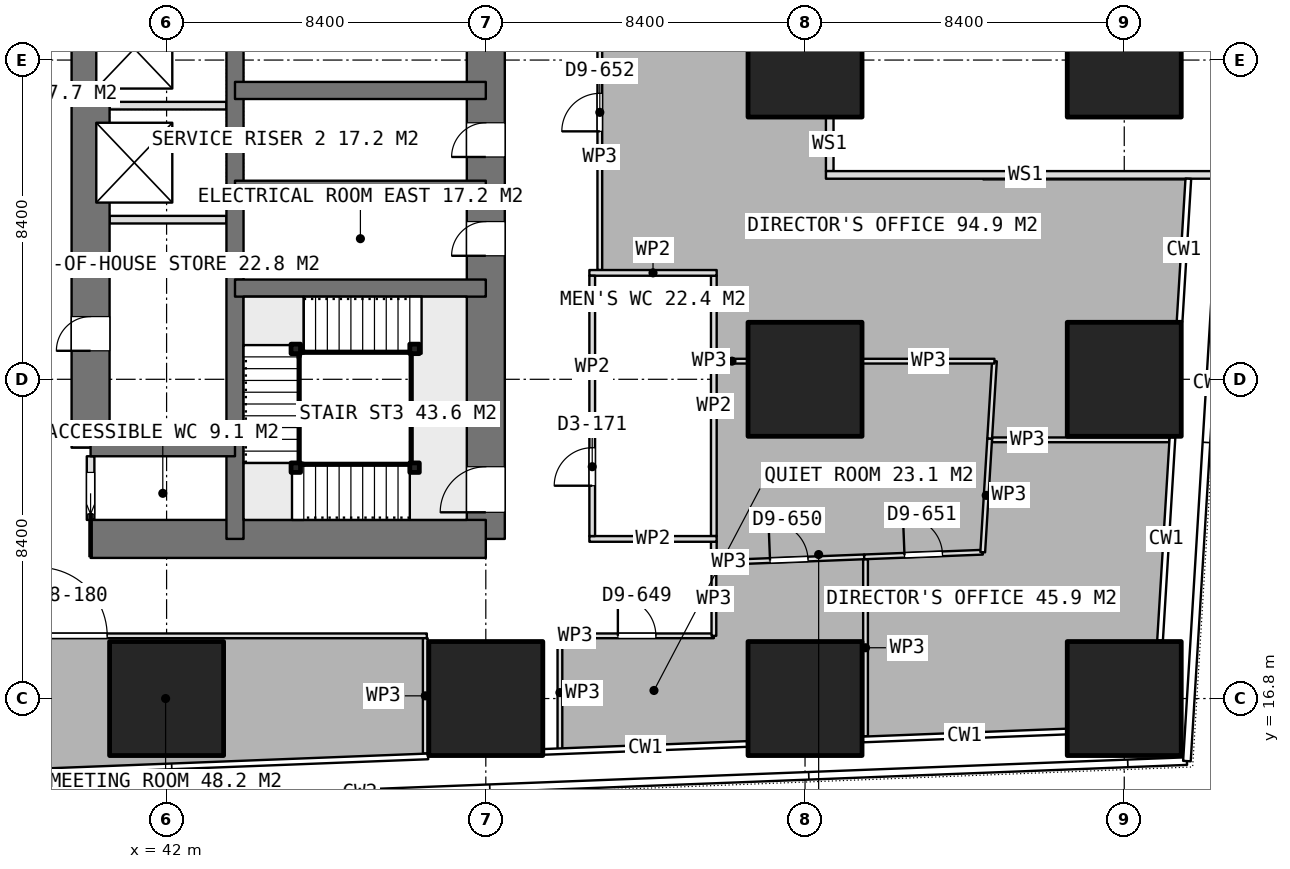
"""IFC4 building model, lengths in metres.
Left out: names, types, materials, properties, quantities, classifications, styles, units other than length and angle.
Written with IfcOpenShell. Run it as: python <this file> out.ifc"""

import sys

from ifc_helpers import new_model, si_unit, direction, frame, frame_2d, origin, origin_2d, place, context, subcontext, project, spatial, rectangle, extrude, element, fill, save


model = new_model("IFC4")
c1 = context("Model", 3, precision=1e-05, world=origin(), true_north=direction((0.0, 1.0)))
c2 = subcontext(c1, "Body", "Model", "MODEL_VIEW")
j1 = project(units=[si_unit("LENGTHUNIT", "METRE"), si_unit("PLANEANGLEUNIT", "RADIAN")], contexts=[c1])
p1 = place(None, origin())
s1 = spatial("IfcSite", under=j1, at=p1, CompositionType="ELEMENT")
p2 = place(p1, origin())
s2 = spatial("IfcBuilding", under=s1, at=p2, CompositionType="ELEMENT")
p3 = place(p2, frame((0.0, 0.0, 159.05)))
s3 = spatial("IfcBuildingStorey", under=s2, at=p3, CompositionType="ELEMENT", Elevation=159.05)
p4 = place(p3, frame((40.0, 21.0, 0.0), z_axis=(0.0, 0.0, 1.0), x_axis=(1.0, 0.0, 0.0)))
e1 = element("IfcWall", 1, at=p4, inside=s3, PredefinedType="SHEAR", context=c2, shape_type="SweptSolid", body=[
    extrude(rectangle(XDim=10.4, YDim=1.0, at=frame_2d((5.2, 0.0))), origin(), (0.0, 0.0, 1.0), 3.75),
])
p5 = place(p3, frame((50.4, 21.0, 0.0), z_axis=(0.0, 0.0, 1.0), x_axis=(0.0, 1.0, 0.0)))
e2 = element("IfcWall", 2, at=p5, inside=s3, PredefinedType="SHEAR", context=c2, shape_type="SweptSolid", body=[
    extrude(rectangle(XDim=25.2, YDim=1.0, at=frame_2d((12.6, 0.0))), origin(), (0.0, 0.0, 1.0), 3.75),
])
p6 = place(p5, frame((16.2, 0.0, 0.0)))
e3 = element("IfcOpeningElement", 3, at=p6, cuts=e2, PredefinedType="OPENING", context=c2, shape_type="SweptSolid", body=[
    extrude(rectangle(XDim=1.2, YDim=2.1, at=frame_2d((0.6, 1.05))), frame((0.0, 0.51, 0.0), z_axis=(0.0, -1.0, 0.0), x_axis=(1.0, 0.0, 0.0)), (0.0, 0.0, 1.0), 1.02),
])
p7 = place(p5, frame((10.05, 0.0, 0.0)))
e4 = element("IfcOpeningElement", 4, at=p7, cuts=e2, PredefinedType="OPENING", context=c2, shape_type="SweptSolid", body=[
    extrude(rectangle(XDim=0.9, YDim=2.1, at=frame_2d((0.45, 1.05))), frame((0.0, 0.51, 0.0), z_axis=(0.0, -1.0, 0.0), x_axis=(1.0, 0.0, 0.0)), (0.0, 0.0, 1.0), 1.02),
])
p8 = place(p5, frame((7.45, 0.0, 0.0)))
e5 = element("IfcOpeningElement", 5, at=p8, cuts=e2, PredefinedType="OPENING", context=c2, shape_type="SweptSolid", body=[
    extrude(rectangle(XDim=0.9, YDim=2.1, at=frame_2d((0.45, 1.05))), frame((0.0, 0.51, 0.0), z_axis=(0.0, -1.0, 0.0), x_axis=(1.0, 0.0, 0.0)), (0.0, 0.0, 1.0), 1.02),
])
p9 = place(p5, frame((0.7, 0.0, 0.0)))
e6 = element("IfcOpeningElement", 6, at=p9, cuts=e2, PredefinedType="OPENING", context=c2, shape_type="SweptSolid", body=[
    extrude(rectangle(XDim=1.2, YDim=2.1, at=frame_2d((0.6, 1.05))), frame((0.0, 0.51, 0.0), z_axis=(0.0, -1.0, 0.0), x_axis=(1.0, 0.0, 0.0)), (0.0, 0.0, 1.0), 1.02),
])
p10 = place(p3, frame((43.8, 21.0, 0.0), z_axis=(0.0, 0.0, 1.0), x_axis=(0.0, 1.0, 0.0)))
e7 = element("IfcWall", 7, at=p10, inside=s3, PredefinedType="SHEAR", context=c2, shape_type="SweptSolid", body=[
    extrude(rectangle(XDim=25.2, YDim=0.45, at=frame_2d((12.6, 0.0))), origin(), (0.0, 0.0, 1.0), 3.75),
])
p11 = place(p3, frame((40.0, 23.4, 0.0), z_axis=(0.0, 0.0, 1.0), x_axis=(0.0, 1.0, 0.0)))
e8 = element("IfcWall", 8, at=p11, inside=s3, PredefinedType="SHEAR", context=c2, shape_type="SweptSolid", body=[
    extrude(rectangle(XDim=18.0, YDim=1.0, at=frame_2d((9.0, 0.0))), origin(), (0.0, 0.0, 1.0), 3.75),
])
p12 = place(p11, frame((2.55, 0.0, 0.0)))
e9 = element("IfcOpeningElement", 9, at=p12, cuts=e8, PredefinedType="OPENING", context=c2, shape_type="SweptSolid", body=[
    extrude(rectangle(XDim=0.9, YDim=2.1, at=frame_2d((0.45, 1.05))), frame((0.0, 0.51, 0.0), z_axis=(0.0, -1.0, 0.0), x_axis=(1.0, 0.0, 0.0)), (0.0, 0.0, 1.0), 1.02),
])
p13 = place(p3, frame((40.0, 23.4, 0.0), z_axis=(0.0, 0.0, 1.0), x_axis=(1.0, 0.0, 0.0)))
e10 = element("IfcWall", 10, at=p13, inside=s3, PredefinedType="SHEAR", context=c2, shape_type="SweptSolid", body=[
    extrude(rectangle(XDim=3.8, YDim=0.45, at=frame_2d((1.9, 0.0))), origin(), (0.0, 0.0, 1.0), 3.75),
])
for number, where, z_axis, x_axis in (
    (11, (43.8, 27.6, 0.0), (0.0, 0.0, 1.0), (1.0, 0.0, 0.0)),
    (12, (43.8, 30.2, 0.0), (0.0, 0.0, 1.0), (1.0, 0.0, 0.0)),
    (13, (43.8, 32.8, 0.0), (0.0, 0.0, 1.0), (1.0, 0.0, 0.0)),
):
    element("IfcWall", number, at=place(p3, frame(where, z_axis=z_axis, x_axis=x_axis)), inside=s3, PredefinedType="SHEAR", context=c2, shape_type="SweptSolid", body=[
        extrude(rectangle(XDim=6.6, YDim=0.45, at=frame_2d((3.3, 0.0))), origin(), (0.0, 0.0, 1.0), 3.75),
    ])
for number, where, z_axis, x_axis in (
    (14, (42.0, 16.8, 0.0), (0.0, 0.0, 1.0), (1.0, 0.0, 0.0)),
    (15, (50.4, 16.8, 0.0), (0.0, 0.0, 1.0), (1.0, 0.0, 0.0)),
    (16, (58.8, 16.8, 0.0), (0.0, 0.0, 1.0), (1.0, 0.0, 0.0)),
    (17, (58.8, 25.2, 0.0), (0.0, 0.0, 1.0), (1.0, 0.0, 0.0)),
    (18, (58.8, 33.6, 0.0), (0.0, 0.0, 1.0), (1.0, 0.0, 0.0)),
    (19, (67.2, 16.8, 0.0), (0.0, 0.0, 1.0), (1.0, 0.0, 0.0)),
    (20, (67.2, 25.2, 0.0), (0.0, 0.0, 1.0), (1.0, 0.0, 0.0)),
    (21, (67.2, 33.6, 0.0), (0.0, 0.0, 1.0), (1.0, 0.0, 0.0)),
):
    element("IfcColumn", number, at=place(p3, frame(where, z_axis=z_axis, x_axis=x_axis)), inside=s3, PredefinedType="COLUMN", context=c2, shape_type="SweptSolid", body=[
        extrude(rectangle(XDim=3.0, YDim=3.0, at=origin_2d()), origin(), (0.0, 0.0, 1.0), 3.75),
    ])
for number, where, z_axis, x_axis in (
    (22, (40.5, 29.4, 0.0), (0.0, 0.0, 1.0), (1.0, 0.0, 0.0)),
    (23, (40.5, 32.4, 0.0), (0.0, 0.0, 1.0), (1.0, 0.0, 0.0)),
):
    element("IfcWall", number, at=place(p3, frame(where, z_axis=z_axis, x_axis=x_axis)), inside=s3, PredefinedType="PARTITIONING", context=c2, shape_type="SweptSolid", body=[
        extrude(rectangle(XDim=3.075, YDim=0.2, at=frame_2d((1.538, 0.0))), origin(), (0.0, 0.0, 1.0), 3.4),
    ])
p14 = place(p3, frame((40.0, 21.5, 0.0), z_axis=(0.0, 0.0, 1.0), x_axis=(0.0, 1.0, 0.0)))
e24 = element("IfcWall", 24, at=p14, inside=s3, PredefinedType="PARTITIONING", context=c2, shape_type="SweptSolid", body=[
    extrude(rectangle(XDim=1.675, YDim=0.2, at=frame_2d((0.837, 0.0))), origin(), (0.0, 0.0, 1.0), 3.4),
])
p15 = place(p14, frame((0.15, 0.0, 0.0)))
e25 = element("IfcOpeningElement", 25, at=p15, cuts=e24, PredefinedType="OPENING", context=c2, shape_type="SweptSolid", body=[
    extrude(rectangle(XDim=1.1, YDim=2.1, at=frame_2d((0.55, 1.05))), frame((0.0, 0.11, 0.0), z_axis=(0.0, -1.0, 0.0), x_axis=(1.0, 0.0, 0.0)), (0.0, 0.0, 1.0), 0.22),
])
for number, where, z_axis, x_axis in (
    (26, (53.125, 21.0, 0.0), (0.0, 0.0, 1.0), (1.0, 0.0, 0.0)),
    (27, (53.125, 28.0, 0.0), (0.0, 0.0, 1.0), (1.0, 0.0, 0.0)),
):
    element("IfcWall", number, at=place(p3, frame(where, z_axis=z_axis, x_axis=x_axis)), inside=s3, PredefinedType="PARTITIONING", context=c2, shape_type="SweptSolid", body=[
        extrude(rectangle(XDim=3.35, YDim=0.15, at=frame_2d((1.675, 0.0))), origin(), (0.0, 0.0, 1.0), 3.4),
    ])
p16 = place(p3, frame((53.2, 21.075, 0.0), z_axis=(0.0, 0.0, 1.0), x_axis=(0.0, 1.0, 0.0)))
e28 = element("IfcWall", 28, at=p16, inside=s3, PredefinedType="PARTITIONING", context=c2, shape_type="SweptSolid", body=[
    extrude(rectangle(XDim=6.85, YDim=0.15, at=frame_2d((3.425, 0.0))), origin(), (0.0, 0.0, 1.0), 3.4),
])
p17 = place(p16, frame((1.325, 0.0, 0.0)))
e29 = element("IfcOpeningElement", 29, at=p17, cuts=e28, PredefinedType="OPENING", context=c2, shape_type="SweptSolid", body=[
    extrude(rectangle(XDim=1.0, YDim=2.1, at=frame_2d((0.5, 1.05))), frame((0.0, 0.085, 0.0), z_axis=(0.0, -1.0, 0.0), x_axis=(1.0, 0.0, 0.0)), (0.0, 0.0, 1.0), 0.17),
])
p18 = place(p3, frame((56.4, 21.075, 0.0), z_axis=(0.0, 0.0, 1.0), x_axis=(0.0, 1.0, 0.0)))
e30 = element("IfcWall", 30, at=p18, inside=s3, PredefinedType="PARTITIONING", context=c2, shape_type="SweptSolid", body=[
    extrude(rectangle(XDim=6.85, YDim=0.15, at=frame_2d((3.425, 0.0))), origin(), (0.0, 0.0, 1.0), 3.4),
])
p19 = place(p3, frame((52.35, 15.463, 0.0), z_axis=(0.0, 0.0, 1.0), x_axis=(0.0, 1.0, 0.0)))
e31 = element("IfcWall", 31, at=p19, inside=s3, PredefinedType="PARTITIONING", context=c2, shape_type="SweptSolid", body=[
    extrude(rectangle(XDim=2.987, YDim=0.125, at=frame_2d((1.494, 0.0))), origin(), (0.0, 0.0, 1.0), 3.4),
])
p20 = place(p3, frame((52.35, 18.45, 0.0), z_axis=(0.0, 0.0, 1.0), x_axis=(1.0, 0.0, 0.0)))
e32 = element("IfcWall", 32, at=p20, inside=s3, PredefinedType="PARTITIONING", context=c2, shape_type="SweptSolid", body=[
    extrude(rectangle(XDim=4.05, YDim=0.125, at=frame_2d((2.025, 0.0))), origin(), (0.0, 0.0, 1.0), 3.4),
])
p21 = place(p20, frame((1.525, 0.0, 0.0)))
e33 = element("IfcOpeningElement", 33, at=p21, cuts=e32, PredefinedType="OPENING", context=c2, shape_type="SweptSolid", body=[
    extrude(rectangle(XDim=1.0, YDim=2.1, at=frame_2d((0.5, 1.05))), frame((0.0, 0.073, 0.0), z_axis=(0.0, -1.0, 0.0), x_axis=(1.0, 0.0, 0.0)), (0.0, 0.0, 1.0), 0.145),
])
p22 = place(p3, frame((56.402, 18.45, 0.0), z_axis=(0.0, 0.0, 1.0), x_axis=(0.0, 1.0, 0.0)))
e34 = element("IfcWall", 34, at=p22, inside=s3, PredefinedType="PARTITIONING", context=c2, shape_type="SweptSolid", body=[
    extrude(rectangle(XDim=1.924, YDim=0.125, at=frame_2d((0.962, 0.0))), origin(), (0.0, 0.0, 1.0), 3.4),
])
p23 = place(p3, frame((56.402, 20.374, 0.0), z_axis=(0.0, 0.0, 1.0), x_axis=(0.999241819363, 0.03893310207, 0.0)))
e35 = element("IfcWall", 35, at=p23, inside=s3, PredefinedType="PARTITIONING", context=c2, shape_type="SweptSolid", body=[
    extrude(rectangle(XDim=3.957, YDim=0.125, at=frame_2d((1.979, 0.0))), origin(), (0.0, 0.0, 1.0), 3.4),
])
p24 = place(p23, frame((1.478, 0.0, 0.0)))
e36 = element("IfcOpeningElement", 36, at=p24, cuts=e35, PredefinedType="OPENING", context=c2, shape_type="SweptSolid", body=[
    extrude(rectangle(XDim=1.0, YDim=2.1, at=frame_2d((0.5, 1.05))), frame((0.0, 0.073, 0.0), z_axis=(0.0, -1.0, 0.0), x_axis=(1.0, 0.0, 0.0)), (0.0, 0.0, 1.0), 0.145),
])
p25 = place(p3, frame((60.392, 20.467, 0.0), z_axis=(0.0, 0.0, 1.0), x_axis=(0.0, -1.0, 0.0)))
e37 = element("IfcWall", 37, at=p25, inside=s3, PredefinedType="PARTITIONING", context=c2, shape_type="SweptSolid", body=[
    extrude(rectangle(XDim=4.661, YDim=0.125, at=frame_2d((2.331, 0.0))), origin(), (0.0, 0.0, 1.0), 3.4),
])
p26 = place(p3, frame((63.72, 23.607, 0.0), z_axis=(0.0, 0.0, 1.0), x_axis=(1.0, 0.0, 0.0)))
e38 = element("IfcWall", 38, at=p26, inside=s3, PredefinedType="PARTITIONING", context=c2, shape_type="SweptSolid", body=[
    extrude(rectangle(XDim=4.666, YDim=0.125, at=frame_2d((2.333, 0.0))), origin(), (0.0, 0.0, 1.0), 3.4),
])
p27 = place(p3, frame((60.357, 20.528, 0.0), z_axis=(0.0, 0.0, 1.0), x_axis=(0.999238123198, 0.03902785093, 0.0)))
e39 = element("IfcWall", 39, at=p27, inside=s3, PredefinedType="PARTITIONING", context=c2, shape_type="SweptSolid", body=[
    extrude(rectangle(XDim=3.122, YDim=0.125, at=frame_2d((1.561, 0.0))), origin(), (0.0, 0.0, 1.0), 3.4),
])
p28 = place(p27, frame((1.061, 0.0, 0.0)))
e40 = element("IfcOpeningElement", 40, at=p28, cuts=e39, PredefinedType="OPENING", context=c2, shape_type="SweptSolid", body=[
    extrude(rectangle(XDim=1.0, YDim=2.1, at=frame_2d((0.5, 1.05))), frame((0.0, 0.073, 0.0), z_axis=(0.0, -1.0, 0.0), x_axis=(1.0, 0.0, 0.0)), (0.0, 0.0, 1.0), 0.145),
])
p29 = place(p3, frame((63.476, 20.65, 0.0), z_axis=(0.0, 0.0, 1.0), x_axis=(0.061018961694, 0.99813660704, 0.0)))
e41 = element("IfcWall", 41, at=p29, inside=s3, PredefinedType="PARTITIONING", context=c2, shape_type="SweptSolid", body=[
    extrude(rectangle(XDim=2.997, YDim=0.125, at=frame_2d((1.499, 0.0))), origin(), (0.0, 0.0, 1.0), 3.4),
])
p30 = place(p3, frame((63.659, 23.642, 0.0), z_axis=(0.0, 0.0, 1.0), x_axis=(0.061312146847, 0.998118640568, 0.0)))
e42 = element("IfcWall", 42, at=p30, inside=s3, PredefinedType="PARTITIONING", context=c2, shape_type="SweptSolid", body=[
    extrude(rectangle(XDim=2.039, YDim=0.125, at=frame_2d((1.02, 0.0))), origin(), (0.0, 0.0, 1.0), 3.4),
])
p31 = place(p3, frame((63.784, 25.677, 0.0), z_axis=(0.0, 0.0, 1.0), x_axis=(-1.0, 0.0, 0.0)))
e43 = element("IfcWall", 43, at=p31, inside=s3, PredefinedType="PARTITIONING", context=c2, shape_type="SweptSolid", body=[
    extrude(rectangle(XDim=3.464, YDim=0.125, at=frame_2d((1.732, 0.0))), origin(), (0.0, 0.0, 1.0), 3.4),
])
p32 = place(p3, frame((57.28, 25.677, 0.0), z_axis=(0.0, 0.0, 1.0), x_axis=(-1.0, 0.0, 0.0)))
e44 = element("IfcWall", 44, at=p32, inside=s3, PredefinedType="PARTITIONING", context=c2, shape_type="SweptSolid", body=[
    extrude(rectangle(XDim=0.805, YDim=0.125, at=frame_2d((0.402, 0.0))), origin(), (0.0, 0.0, 1.0), 3.4),
])
p33 = place(p3, frame((53.4, 28.075, 0.0), z_axis=(0.0, 0.0, 1.0), x_axis=(0.0, 1.0, 0.0)))
e45 = element("IfcWall", 45, at=p33, inside=s3, PredefinedType="PARTITIONING", context=c2, shape_type="SweptSolid", body=[
    extrude(rectangle(XDim=8.514, YDim=0.125, at=frame_2d((4.257, 0.0))), origin(), (0.0, 0.0, 1.0), 3.4),
])
p34 = place(p33, frame((3.649, 0.0, 0.0)))
e46 = element("IfcOpeningElement", 46, at=p34, cuts=e45, PredefinedType="OPENING", context=c2, shape_type="SweptSolid", body=[
    extrude(rectangle(XDim=1.0, YDim=2.1, at=frame_2d((0.5, 1.05))), frame((0.0, 0.073, 0.0), z_axis=(0.0, -1.0, 0.0), x_axis=(1.0, 0.0, 0.0)), (0.0, 0.0, 1.0), 0.145),
])
p35 = place(p3, frame((33.826, 18.45, 0.0), z_axis=(0.0, 0.0, 1.0), x_axis=(1.0, 0.0, 0.0)))
e47 = element("IfcWall", 47, at=p35, inside=s3, PredefinedType="PARTITIONING", context=c2, shape_type="SweptSolid", body=[
    extrude(rectangle(XDim=15.022, YDim=0.125, at=frame_2d((7.511, 0.0))), origin(), (0.0, 0.0, 1.0), 3.4),
])
p36 = place(p35, frame((4.811, 0.0, 0.0)))
e48 = element("IfcOpeningElement", 48, at=p36, cuts=e47, PredefinedType="OPENING", context=c2, shape_type="SweptSolid", body=[
    extrude(rectangle(XDim=1.8, YDim=2.1, at=frame_2d((0.9, 1.05))), frame((0.0, 0.073, 0.0), z_axis=(0.0, -1.0, 0.0), x_axis=(1.0, 0.0, 0.0)), (0.0, 0.0, 1.0), 0.145),
])
p37 = place(p3, frame((48.807, 18.387, 0.0), z_axis=(0.0, 0.0, 1.0), x_axis=(0.0, -1.0, 0.0)))
e49 = element("IfcWall", 49, at=p37, inside=s3, PredefinedType="PARTITIONING", context=c2, shape_type="SweptSolid", body=[
    extrude(rectangle(XDim=3.032, YDim=0.125, at=frame_2d((1.516, 0.0))), origin(), (0.0, 0.0, 1.0), 3.4),
])
p38 = place(p3, frame((56.4, 20.374, 0.0), z_axis=(0.0, 0.0, 1.0), x_axis=(0.0, 1.0, 0.0)))
e50 = element("IfcWall", 50, at=p38, inside=s3, PredefinedType="PARTITIONING", context=c2, shape_type="SweptSolid", body=[
    extrude(rectangle(XDim=0.551, YDim=0.15, at=frame_2d((0.275, 0.0))), origin(), (0.0, 0.0, 1.0), 3.4),
])
for number, where, z_axis, x_axis in (
    (51, (48.525, 22.875, 0.0), (0.0, 0.0, 1.0), (1.0, 0.0, 0.0)),
    (52, (45.4, 22.875, 0.0), (0.0, 0.0, 1.0), (1.0, 0.0, 0.0)),
    (53, (45.4, 26.0, 0.0), (0.0, 0.0, 1.0), (1.0, 0.0, 0.0)),
    (54, (48.525, 26.0, 0.0), (0.0, 0.0, 1.0), (1.0, 0.0, 0.0)),
):
    element("IfcColumn", number, at=place(p3, frame(where, z_axis=z_axis, x_axis=x_axis)), inside=s3, PredefinedType="COLUMN", context=c2, shape_type="SweptSolid", body=[
        extrude(rectangle(XDim=0.25, YDim=0.25, at=origin_2d()), origin(), (0.0, 0.0, 1.0), 3.75),
    ])
p39 = place(p3, frame((59.45, 30.678, 0.0), z_axis=(0.0, 0.0, 1.0), x_axis=(0.0, 1.0, 0.0)))
e55 = element("IfcWall", 55, at=p39, inside=s3, PredefinedType="PARTITIONING", context=c2, shape_type="SweptSolid", body=[
    extrude(rectangle(XDim=1.422, YDim=0.2, at=frame_2d((0.711, 0.0))), origin(), (0.0, 0.0, 1.0), 3.4),
])
p40 = place(p3, frame((59.35, 30.578, 0.0), z_axis=(0.0, 0.0, 1.0), x_axis=(1.0, 0.0, 0.0)))
e56 = element("IfcWall", 56, at=p40, inside=s3, PredefinedType="PARTITIONING", context=c2, shape_type="SweptSolid", body=[
    extrude(rectangle(XDim=10.505, YDim=0.2, at=frame_2d((5.252, 0.0))), origin(), (0.0, 0.0, 1.0), 3.4),
])
p41 = place(p7, origin())
e57 = element("IfcDoor", 57, at=p41, inside=s3, OperationType="SINGLE_SWING_LEFT", PredefinedType="DOOR", context=c2, shape_type="SweptSolid", body=[
    extrude(rectangle(XDim=0.9, YDim=2.1, at=frame_2d((0.45, 1.05))), frame((0.0, 0.025, 0.0), z_axis=(0.0, -1.0, 0.0), x_axis=(1.0, 0.0, 0.0)), (0.0, 0.0, 1.0), 0.05),
])
fill(e4, e57)
p42 = place(p8, origin())
e58 = element("IfcDoor", 58, at=p42, inside=s3, OperationType="SINGLE_SWING_LEFT", PredefinedType="DOOR", context=c2, shape_type="SweptSolid", body=[
    extrude(rectangle(XDim=0.9, YDim=2.1, at=frame_2d((0.45, 1.05))), frame((0.0, 0.025, 0.0), z_axis=(0.0, -1.0, 0.0), x_axis=(1.0, 0.0, 0.0)), (0.0, 0.0, 1.0), 0.05),
])
fill(e5, e58)
p43 = place(p15, origin())
e59 = element("IfcDoor", 59, at=p43, inside=s3, OperationType="SLIDING_TO_LEFT", PredefinedType="DOOR", context=c2, shape_type="SweptSolid", body=[
    extrude(rectangle(XDim=1.1, YDim=2.1, at=frame_2d((0.55, 1.05))), frame((0.0, 0.025, 0.0), z_axis=(0.0, -1.0, 0.0), x_axis=(1.0, 0.0, 0.0)), (0.0, 0.0, 1.0), 0.05),
])
fill(e25, e59)
p44 = place(p12, origin())
e60 = element("IfcDoor", 60, at=p44, inside=s3, OperationType="SINGLE_SWING_LEFT", PredefinedType="DOOR", context=c2, shape_type="SweptSolid", body=[
    extrude(rectangle(XDim=0.9, YDim=2.1, at=frame_2d((0.45, 1.05))), frame((0.0, 0.025, 0.0), z_axis=(0.0, -1.0, 0.0), x_axis=(1.0, 0.0, 0.0)), (0.0, 0.0, 1.0), 0.05),
])
fill(e9, e60)
p45 = place(p17, origin())
e61 = element("IfcDoor", 61, at=p45, inside=s3, OperationType="SINGLE_SWING_LEFT", PredefinedType="DOOR", context=c2, shape_type="SweptSolid", body=[
    extrude(rectangle(XDim=1.0, YDim=2.1, at=frame_2d((0.5, 1.05))), frame((0.0, 0.025, 0.0), z_axis=(0.0, -1.0, 0.0), x_axis=(1.0, 0.0, 0.0)), (0.0, 0.0, 1.0), 0.05),
])
fill(e29, e61)
p46 = place(p21, origin())
e62 = element("IfcDoor", 62, at=p46, inside=s3, OperationType="SINGLE_SWING_LEFT", PredefinedType="DOOR", context=c2, shape_type="SweptSolid", body=[
    extrude(rectangle(XDim=1.0, YDim=2.1, at=frame_2d((0.5, 1.05))), frame((0.0, 0.025, 0.0), z_axis=(0.0, -1.0, 0.0), x_axis=(1.0, 0.0, 0.0)), (0.0, 0.0, 1.0), 0.05),
])
fill(e33, e62)
p47 = place(p24, origin())
e63 = element("IfcDoor", 63, at=p47, inside=s3, OperationType="SINGLE_SWING_LEFT", PredefinedType="DOOR", context=c2, shape_type="SweptSolid", body=[
    extrude(rectangle(XDim=1.0, YDim=2.1, at=frame_2d((0.5, 1.05))), frame((0.0, 0.025, 0.0), z_axis=(0.0, -1.0, 0.0), x_axis=(1.0, 0.0, 0.0)), (0.0, 0.0, 1.0), 0.05),
])
fill(e36, e63)
p48 = place(p28, origin())
e64 = element("IfcDoor", 64, at=p48, inside=s3, OperationType="SINGLE_SWING_LEFT", PredefinedType="DOOR", context=c2, shape_type="SweptSolid", body=[
    extrude(rectangle(XDim=1.0, YDim=2.1, at=frame_2d((0.5, 1.05))), frame((0.0, 0.025, 0.0), z_axis=(0.0, -1.0, 0.0), x_axis=(1.0, 0.0, 0.0)), (0.0, 0.0, 1.0), 0.05),
])
fill(e40, e64)
p49 = place(p34, origin())
e65 = element("IfcDoor", 65, at=p49, inside=s3, OperationType="SINGLE_SWING_LEFT", PredefinedType="DOOR", context=c2, shape_type="SweptSolid", body=[
    extrude(rectangle(XDim=1.0, YDim=2.1, at=frame_2d((0.5, 1.05))), frame((0.0, 0.025, 0.0), z_axis=(0.0, -1.0, 0.0), x_axis=(1.0, 0.0, 0.0)), (0.0, 0.0, 1.0), 0.05),
])
fill(e46, e65)
p50 = place(p36, origin())
e66 = element("IfcDoor", 66, at=p50, inside=s3, OperationType="DOUBLE_DOOR_SINGLE_SWING", PredefinedType="DOOR", context=c2, shape_type="SweptSolid", body=[
    extrude(rectangle(XDim=1.8, YDim=2.1, at=frame_2d((0.9, 1.05))), frame((0.0, 0.025, 0.0), z_axis=(0.0, -1.0, 0.0), x_axis=(1.0, 0.0, 0.0)), (0.0, 0.0, 1.0), 0.05),
])
fill(e48, e66)
p51 = place(p9, origin())
e67 = element("IfcDoor", 67, at=p51, inside=s3, OperationType="SINGLE_SWING_RIGHT", PredefinedType="DOOR", context=c2, shape_type="SweptSolid", body=[
    extrude(rectangle(XDim=1.2, YDim=2.1, at=frame_2d((0.6, 1.05))), frame((0.0, 0.025, 0.0), z_axis=(0.0, -1.0, 0.0), x_axis=(1.0, 0.0, 0.0)), (0.0, 0.0, 1.0), 0.05),
])
fill(e6, e67)
save(model, sys.argv[1])
